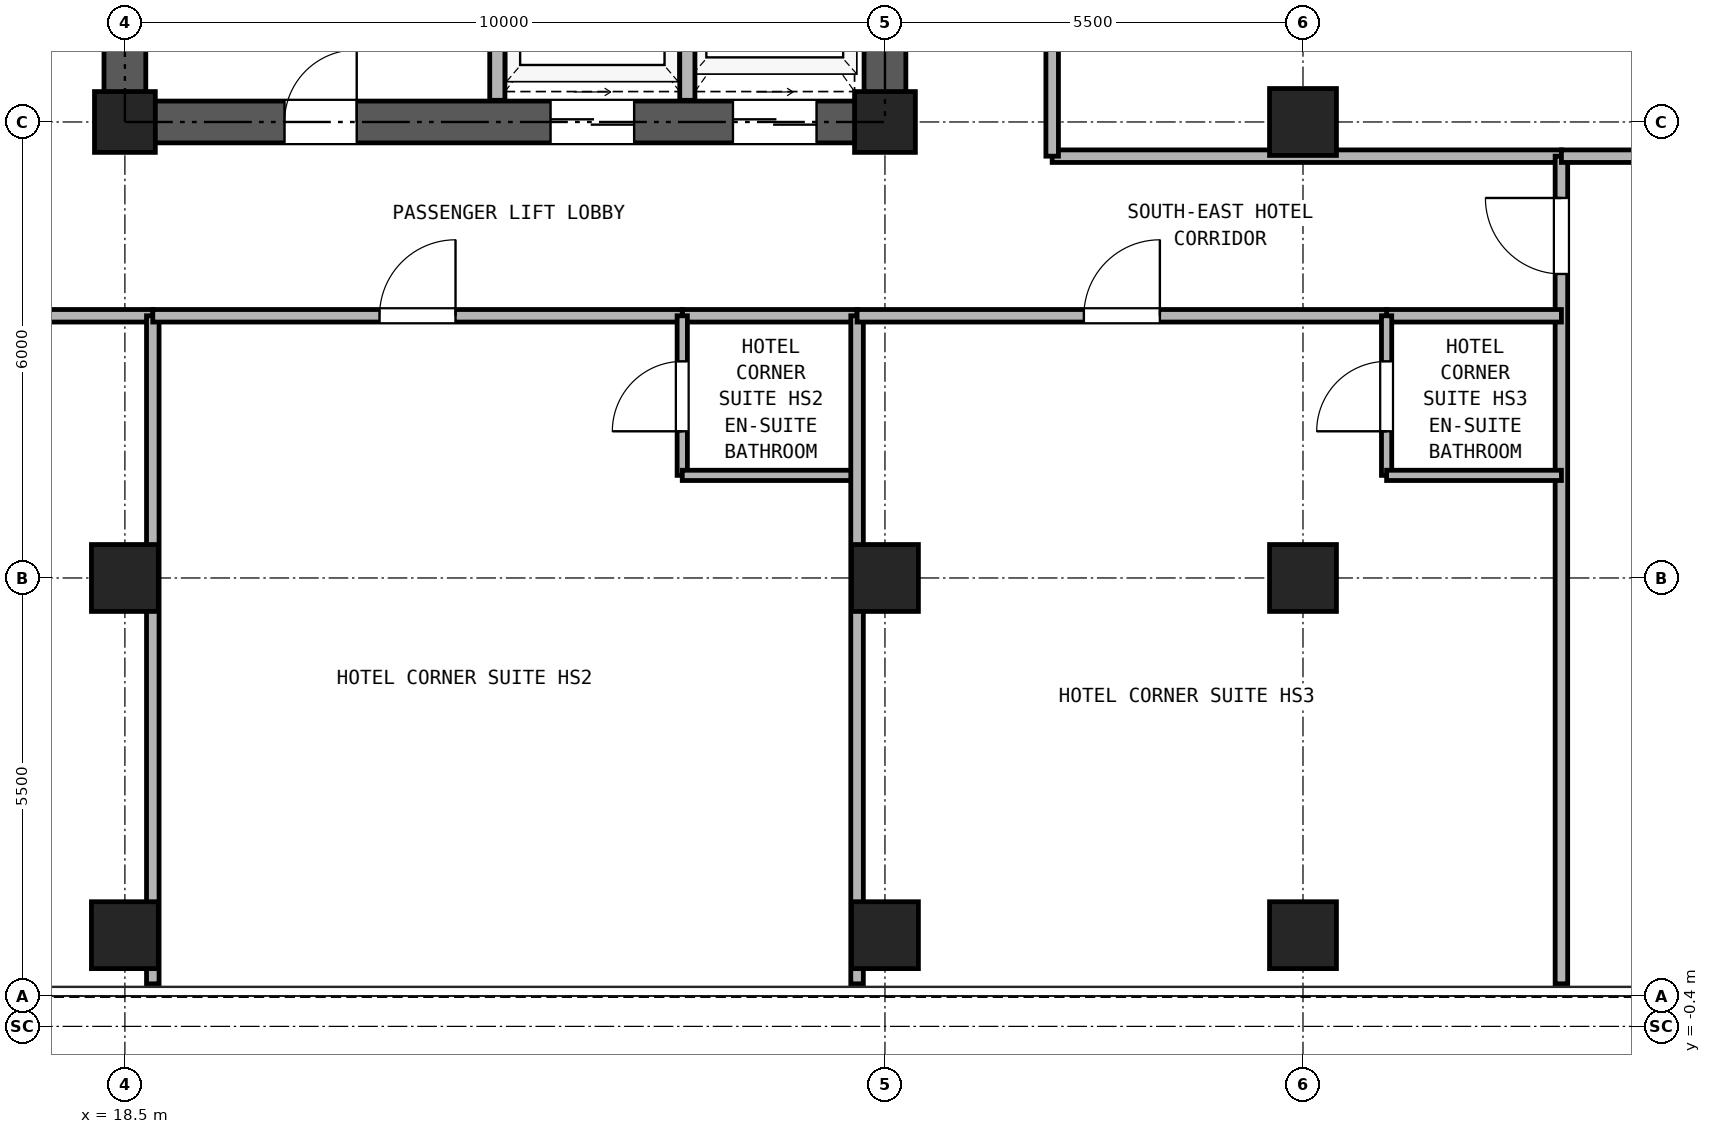
"""IFC4 building model, lengths in metres.
Left out: names, types, materials, properties, quantities, classifications, styles, units other than length and angle.
Written with IfcOpenShell. Run it as: python <this file> out.ifc"""

import sys

from ifc_helpers import new_model, si_unit, direction, frame, frame_2d, origin, origin_2d, place, context, subcontext, project, spatial, rectangle, hollow_rectangle, extrude, source, transform, mapped, element, fill, save


model = new_model("IFC4")
c1 = context("Model", 3, precision=1e-05, world=origin(), true_north=direction((0.0, 1.0)))
c2 = subcontext(c1, "Body", "Model", "MODEL_VIEW")
j1 = project(units=[si_unit("LENGTHUNIT", "METRE"), si_unit("PLANEANGLEUNIT", "RADIAN")], contexts=[c1])
p1 = place(None, origin())
s1 = spatial("IfcSite", under=j1, at=p1, CompositionType="ELEMENT")
p2 = place(p1, origin())
s2 = spatial("IfcBuilding", under=s1, at=p2, CompositionType="ELEMENT")
p3 = place(p2, frame((0.0, 0.0, 127.9)))
s3 = spatial("IfcBuildingStorey", under=s2, at=p3, CompositionType="ELEMENT", Elevation=127.9)
m1 = source(origin(), c2, "Body", "SweptSolid", [
    extrude(hollow_rectangle(XDim=0.88, YDim=0.88, WallThickness=0.05, at=origin_2d()), origin(), (0.0, 0.0, 1.0), 2.95),
])
for number, where, z_axis, x_axis in (
    (1, (18.5, 0.8, 0.0), (0.0, 0.0, 1.0), (1.0, 0.0, 0.0)),
    (2, (28.5, 0.8, 0.0), (0.0, 0.0, 1.0), (1.0, 0.0, 0.0)),
    (3, (34.0, 0.8, 0.0), (0.0, 0.0, 1.0), (1.0, 0.0, 0.0)),
    (4, (18.5, 5.5, 0.0), (0.0, 0.0, 1.0), (1.0, 0.0, 0.0)),
):
    element("IfcColumn", number, at=place(p3, frame(where, z_axis=z_axis, x_axis=x_axis)), inside=s3, PredefinedType="COLUMN", context=c2, shape_type="MappedRepresentation", body=[
        mapped(m1, transform((0.0, 0.0, 0.0), x_axis=(1.0, 0.0, 0.0), y_axis=(0.0, 1.0, 0.0), z_axis=(0.0, 0.0, 1.0), scale=1.0)),
    ])
m2 = source(origin(), c2, "Body", "SweptSolid", [
    extrude(hollow_rectangle(XDim=0.8, YDim=0.8, WallThickness=0.045, at=origin_2d()), origin(), (0.0, 0.0, 1.0), 2.95),
])
p4 = place(p3, frame((18.5, 11.5, 0.0), z_axis=(0.0, 0.0, 1.0), x_axis=(1.0, 0.0, 0.0)))
e5 = element("IfcColumn", 5, at=p4, inside=s3, PredefinedType="COLUMN", context=c2, shape_type="MappedRepresentation", body=[
    mapped(m2, transform((0.0, 0.0, 0.0), x_axis=(1.0, 0.0, 0.0), y_axis=(0.0, 1.0, 0.0), z_axis=(0.0, 0.0, 1.0), scale=1.0)),
])
p5 = place(p3, frame((28.5, 5.5, 0.0), z_axis=(0.0, 0.0, 1.0), x_axis=(1.0, 0.0, 0.0)))
e6 = element("IfcColumn", 6, at=p5, inside=s3, PredefinedType="COLUMN", context=c2, shape_type="MappedRepresentation", body=[
    mapped(m1, transform((0.0, 0.0, 0.0), x_axis=(1.0, 0.0, 0.0), y_axis=(0.0, 1.0, 0.0), z_axis=(0.0, 0.0, 1.0), scale=1.0)),
])
p6 = place(p3, frame((28.5, 11.5, 0.0), z_axis=(0.0, 0.0, 1.0), x_axis=(1.0, 0.0, 0.0)))
e7 = element("IfcColumn", 7, at=p6, inside=s3, PredefinedType="COLUMN", context=c2, shape_type="MappedRepresentation", body=[
    mapped(m2, transform((0.0, 0.0, 0.0), x_axis=(1.0, 0.0, 0.0), y_axis=(0.0, 1.0, 0.0), z_axis=(0.0, 0.0, 1.0), scale=1.0)),
])
for number, where, z_axis, x_axis in (
    (8, (34.0, 5.5, 0.0), (0.0, 0.0, 1.0), (1.0, 0.0, 0.0)),
    (9, (34.0, 11.5, 0.0), (0.0, 0.0, 1.0), (1.0, 0.0, 0.0)),
):
    element("IfcColumn", number, at=place(p3, frame(where, z_axis=z_axis, x_axis=x_axis)), inside=s3, PredefinedType="COLUMN", context=c2, shape_type="MappedRepresentation", body=[
        mapped(m1, transform((0.0, 0.0, 0.0), x_axis=(1.0, 0.0, 0.0), y_axis=(0.0, 1.0, 0.0), z_axis=(0.0, 0.0, 1.0), scale=1.0)),
    ])
p7 = place(p3, frame((18.225, 11.5, 0.0), z_axis=(0.0, 0.0, 1.0), x_axis=(1.0, 0.0, 0.0)))
e10 = element("IfcWall", 10, at=p7, inside=s3, PredefinedType="SHEAR", context=c2, shape_type="SweptSolid", body=[
    extrude(rectangle(XDim=10.55, YDim=0.55, at=frame_2d((5.275, 0.0))), origin(), (0.0, 0.0, 1.0), 2.95),
])
p8 = place(p7, frame((2.375, 0.0, 0.0)))
e11 = element("IfcOpeningElement", 11, at=p8, cuts=e10, PredefinedType="OPENING", context=c2, shape_type="SweptSolid", body=[
    extrude(rectangle(XDim=0.95, YDim=2.15, at=frame_2d((0.475, 1.075))), frame((0.0, 0.285, 0.0), z_axis=(0.0, -1.0, 0.0), x_axis=(1.0, 0.0, 0.0)), (0.0, 0.0, 1.0), 0.57),
])
p9 = place(p7, frame((5.875, 0.0, 0.0)))
e12 = element("IfcOpeningElement", 12, at=p9, cuts=e10, PredefinedType="OPENING", context=c2, shape_type="SweptSolid", body=[
    extrude(rectangle(XDim=1.1, YDim=2.25, at=frame_2d((0.55, 1.125))), frame((0.0, 0.285, 0.0), z_axis=(0.0, -1.0, 0.0), x_axis=(1.0, 0.0, 0.0)), (0.0, 0.0, 1.0), 0.57),
])
p10 = place(p7, frame((8.275, 0.0, 0.0)))
e13 = element("IfcOpeningElement", 13, at=p10, cuts=e10, PredefinedType="OPENING", context=c2, shape_type="SweptSolid", body=[
    extrude(rectangle(XDim=1.1, YDim=2.25, at=frame_2d((0.55, 1.125))), frame((0.0, 0.285, 0.0), z_axis=(0.0, -1.0, 0.0), x_axis=(1.0, 0.0, 0.0)), (0.0, 0.0, 1.0), 0.57),
])
p11 = place(p3, frame((18.5, 11.775, 0.0), z_axis=(0.0, 0.0, 1.0), x_axis=(0.0, 1.0, 0.0)))
e14 = element("IfcWall", 14, at=p11, inside=s3, PredefinedType="SHEAR", context=c2, shape_type="SweptSolid", body=[
    extrude(rectangle(XDim=16.7, YDim=0.55, at=frame_2d((8.35, 0.0))), origin(), (0.0, 0.0, 1.0), 2.95),
])
p12 = place(p11, frame((7.375, 0.0, 0.0)))
e15 = element("IfcOpeningElement", 15, at=p12, cuts=e14, PredefinedType="OPENING", context=c2, shape_type="SweptSolid", body=[
    extrude(rectangle(XDim=1.15, YDim=2.2, at=frame_2d((0.575, 1.1))), frame((0.0, 0.285, 0.0), z_axis=(0.0, -1.0, 0.0), x_axis=(1.0, 0.0, 0.0)), (0.0, 0.0, 1.0), 0.57),
])
p13 = place(p3, frame((28.5, 11.775, 0.0), z_axis=(0.0, 0.0, 1.0), x_axis=(0.0, 1.0, 0.0)))
e16 = element("IfcWall", 16, at=p13, inside=s3, PredefinedType="SHEAR", context=c2, shape_type="SweptSolid", body=[
    extrude(rectangle(XDim=16.7, YDim=0.55, at=frame_2d((8.35, 0.0))), origin(), (0.0, 0.0, 1.0), 2.95),
])
p14 = place(p13, frame((7.375, 0.0, 0.0)))
e17 = element("IfcOpeningElement", 17, at=p14, cuts=e16, PredefinedType="OPENING", context=c2, shape_type="SweptSolid", body=[
    extrude(rectangle(XDim=1.15, YDim=2.2, at=frame_2d((0.575, 1.1))), frame((0.0, 0.285, 0.0), z_axis=(0.0, -1.0, 0.0), x_axis=(1.0, 0.0, 0.0)), (0.0, 0.0, 1.0), 0.57),
])
for number, where, z_axis, x_axis in (
    (18, (23.4, 11.785, 0.0), (0.0, 0.0, 1.0), (0.0, 1.0, 0.0)),
    (19, (25.9, 11.785, 0.0), (0.0, 0.0, 1.0), (0.0, 1.0, 0.0)),
):
    element("IfcWall", number, at=place(p3, frame(where, z_axis=z_axis, x_axis=x_axis)), inside=s3, PredefinedType="PARTITIONING", context=c2, shape_type="SweptSolid", body=[
        extrude(rectangle(XDim=3.215, YDim=0.2, at=frame_2d((1.607, 0.0))), origin(), (0.0, 0.0, 1.0), 2.95),
    ])
p15 = place(p3, frame((30.7, 11.05, 0.0), z_axis=(0.0, 0.0, 1.0), x_axis=(1.0, 0.0, 0.0)))
e20 = element("IfcWall", 20, at=p15, inside=s3, PredefinedType="PARTITIONING", context=c2, shape_type="SweptSolid", body=[
    extrude(rectangle(XDim=6.7, YDim=0.165, at=frame_2d((3.35, 0.0))), origin(), (0.0, 0.0, 1.0), 2.95),
])
p16 = place(p3, frame((30.7, 11.05, 0.0), z_axis=(0.0, 0.0, 1.0), x_axis=(0.0, 1.0, 0.0)))
e21 = element("IfcWall", 21, at=p16, inside=s3, PredefinedType="PARTITIONING", context=c2, shape_type="SweptSolid", body=[
    extrude(rectangle(XDim=18.35, YDim=0.165, at=frame_2d((9.175, 0.0))), origin(), (0.0, 0.0, 1.0), 2.95),
])
p17 = place(p16, frame((8.675, 0.0, 0.0)))
e22 = element("IfcOpeningElement", 22, at=p17, cuts=e21, PredefinedType="OPENING", context=c2, shape_type="SweptSolid", body=[
    extrude(rectangle(XDim=0.95, YDim=2.15, at=frame_2d((0.475, 1.075))), frame((0.0, 0.093, 0.0), z_axis=(0.0, -1.0, 0.0), x_axis=(1.0, 0.0, 0.0)), (0.0, 0.0, 1.0), 0.185),
])
p18 = place(p3, frame((37.4, 0.16, 0.0), z_axis=(0.0, 0.0, 1.0), x_axis=(0.0, 1.0, 0.0)))
e23 = element("IfcWall", 23, at=p18, inside=s3, PredefinedType="PARTITIONING", context=c2, shape_type="SweptSolid", body=[
    extrude(rectangle(XDim=10.89, YDim=0.165, at=frame_2d((5.445, 0.0))), origin(), (0.0, 0.0, 1.0), 2.95),
])
p19 = place(p18, frame((9.34, 0.0, 0.0)))
e24 = element("IfcOpeningElement", 24, at=p19, cuts=e23, PredefinedType="OPENING", context=c2, shape_type="SweptSolid", body=[
    extrude(rectangle(XDim=1.0, YDim=2.15, at=frame_2d((0.5, 1.075))), frame((0.0, 0.093, 0.0), z_axis=(0.0, -1.0, 0.0), x_axis=(1.0, 0.0, 0.0)), (0.0, 0.0, 1.0), 0.185),
])
p20 = place(p3, frame((37.4, 11.05, 0.0), z_axis=(0.0, 0.0, 1.0), x_axis=(1.0, 0.0, 0.0)))
e25 = element("IfcWall", 25, at=p20, inside=s3, PredefinedType="PARTITIONING", context=c2, shape_type="SweptSolid", body=[
    extrude(rectangle(XDim=9.44, YDim=0.165, at=frame_2d((4.72, 0.0))), origin(), (0.0, 0.0, 1.0), 2.95),
])
p21 = place(p3, frame((11.9, 8.95, 0.0), z_axis=(0.0, 0.0, 1.0), x_axis=(1.0, 0.0, 0.0)))
e26 = element("IfcWall", 26, at=p21, inside=s3, PredefinedType="PARTITIONING", context=c2, shape_type="SweptSolid", body=[
    extrude(rectangle(XDim=6.967, YDim=0.165, at=frame_2d((3.483, 0.0))), origin(), (0.0, 0.0, 1.0), 2.95),
])
p22 = place(p21, frame((2.983, 0.0, 0.0)))
e27 = element("IfcOpeningElement", 27, at=p22, cuts=e26, PredefinedType="OPENING", context=c2, shape_type="SweptSolid", body=[
    extrude(rectangle(XDim=1.0, YDim=2.15, at=frame_2d((0.5, 1.075))), frame((0.0, 0.093, 0.0), z_axis=(0.0, -1.0, 0.0), x_axis=(1.0, 0.0, 0.0)), (0.0, 0.0, 1.0), 0.185),
])
p23 = place(p3, frame((18.867, 0.16, 0.0), z_axis=(0.0, 0.0, 1.0), x_axis=(0.0, 1.0, 0.0)))
e28 = element("IfcWall", 28, at=p23, inside=s3, PredefinedType="PARTITIONING", context=c2, shape_type="SweptSolid", body=[
    extrude(rectangle(XDim=8.79, YDim=0.165, at=frame_2d((4.395, 0.0))), origin(), (0.0, 0.0, 1.0), 2.95),
])
p24 = place(p3, frame((25.833, 8.95, 0.0), z_axis=(0.0, 0.0, 1.0), x_axis=(1.0, 0.0, 0.0)))
e29 = element("IfcWall", 29, at=p24, inside=s3, PredefinedType="PARTITIONING", context=c2, shape_type="SweptSolid", body=[
    extrude(rectangle(XDim=2.3, YDim=0.165, at=frame_2d((1.15, 0.0))), origin(), (0.0, 0.0, 1.0), 2.95),
])
p25 = place(p3, frame((18.867, 8.95, 0.0), z_axis=(0.0, 0.0, 1.0), x_axis=(1.0, 0.0, 0.0)))
e30 = element("IfcWall", 30, at=p25, inside=s3, PredefinedType="PARTITIONING", context=c2, shape_type="SweptSolid", body=[
    extrude(rectangle(XDim=6.966, YDim=0.165, at=frame_2d((3.483, 0.0))), origin(), (0.0, 0.0, 1.0), 2.95),
])
p26 = place(p25, frame((2.983, 0.0, 0.0)))
e31 = element("IfcOpeningElement", 31, at=p26, cuts=e30, PredefinedType="OPENING", context=c2, shape_type="SweptSolid", body=[
    extrude(rectangle(XDim=1.0, YDim=2.15, at=frame_2d((0.5, 1.075))), frame((0.0, 0.093, 0.0), z_axis=(0.0, -1.0, 0.0), x_axis=(1.0, 0.0, 0.0)), (0.0, 0.0, 1.0), 0.185),
])
p27 = place(p3, frame((25.833, 6.85, 0.0), z_axis=(0.0, 0.0, 1.0), x_axis=(0.0, 1.0, 0.0)))
e32 = element("IfcWall", 32, at=p27, inside=s3, PredefinedType="PARTITIONING", context=c2, shape_type="SweptSolid", body=[
    extrude(rectangle(XDim=2.1, YDim=0.135, at=frame_2d((1.05, 0.0))), origin(), (0.0, 0.0, 1.0), 2.95),
])
p28 = place(p27, frame((0.58, 0.0, 0.0)))
e33 = element("IfcOpeningElement", 33, at=p28, cuts=e32, PredefinedType="OPENING", context=c2, shape_type="SweptSolid", body=[
    extrude(rectangle(XDim=0.92, YDim=2.1, at=frame_2d((0.46, 1.05))), frame((0.0, 0.077, 0.0), z_axis=(0.0, -1.0, 0.0), x_axis=(1.0, 0.0, 0.0)), (0.0, 0.0, 1.0), 0.155),
])
p29 = place(p3, frame((25.833, 6.85, 0.0), z_axis=(0.0, 0.0, 1.0), x_axis=(1.0, 0.0, 0.0)))
e34 = element("IfcWall", 34, at=p29, inside=s3, PredefinedType="PARTITIONING", context=c2, shape_type="SweptSolid", body=[
    extrude(rectangle(XDim=2.3, YDim=0.135, at=frame_2d((1.15, 0.0))), origin(), (0.0, 0.0, 1.0), 2.95),
])
p30 = place(p3, frame((28.133, 0.16, 0.0), z_axis=(0.0, 0.0, 1.0), x_axis=(0.0, 1.0, 0.0)))
e35 = element("IfcWall", 35, at=p30, inside=s3, PredefinedType="PARTITIONING", context=c2, shape_type="SweptSolid", body=[
    extrude(rectangle(XDim=8.79, YDim=0.165, at=frame_2d((4.395, 0.0))), origin(), (0.0, 0.0, 1.0), 2.95),
])
p31 = place(p3, frame((35.1, 8.95, 0.0), z_axis=(0.0, 0.0, 1.0), x_axis=(1.0, 0.0, 0.0)))
e36 = element("IfcWall", 36, at=p31, inside=s3, PredefinedType="PARTITIONING", context=c2, shape_type="SweptSolid", body=[
    extrude(rectangle(XDim=2.3, YDim=0.165, at=frame_2d((1.15, 0.0))), origin(), (0.0, 0.0, 1.0), 2.95),
])
p32 = place(p3, frame((28.133, 8.95, 0.0), z_axis=(0.0, 0.0, 1.0), x_axis=(1.0, 0.0, 0.0)))
e37 = element("IfcWall", 37, at=p32, inside=s3, PredefinedType="PARTITIONING", context=c2, shape_type="SweptSolid", body=[
    extrude(rectangle(XDim=6.967, YDim=0.165, at=frame_2d((3.483, 0.0))), origin(), (0.0, 0.0, 1.0), 2.95),
])
p33 = place(p32, frame((2.984, 0.0, 0.0)))
e38 = element("IfcOpeningElement", 38, at=p33, cuts=e37, PredefinedType="OPENING", context=c2, shape_type="SweptSolid", body=[
    extrude(rectangle(XDim=1.0, YDim=2.15, at=frame_2d((0.5, 1.075))), frame((0.0, 0.093, 0.0), z_axis=(0.0, -1.0, 0.0), x_axis=(1.0, 0.0, 0.0)), (0.0, 0.0, 1.0), 0.185),
])
p34 = place(p3, frame((35.1, 6.85, 0.0), z_axis=(0.0, 0.0, 1.0), x_axis=(0.0, 1.0, 0.0)))
e39 = element("IfcWall", 39, at=p34, inside=s3, PredefinedType="PARTITIONING", context=c2, shape_type="SweptSolid", body=[
    extrude(rectangle(XDim=2.1, YDim=0.135, at=frame_2d((1.05, 0.0))), origin(), (0.0, 0.0, 1.0), 2.95),
])
p35 = place(p34, frame((0.58, 0.0, 0.0)))
e40 = element("IfcOpeningElement", 40, at=p35, cuts=e39, PredefinedType="OPENING", context=c2, shape_type="SweptSolid", body=[
    extrude(rectangle(XDim=0.92, YDim=2.1, at=frame_2d((0.46, 1.05))), frame((0.0, 0.077, 0.0), z_axis=(0.0, -1.0, 0.0), x_axis=(1.0, 0.0, 0.0)), (0.0, 0.0, 1.0), 0.155),
])
p36 = place(p3, frame((35.1, 6.85, 0.0), z_axis=(0.0, 0.0, 1.0), x_axis=(1.0, 0.0, 0.0)))
e41 = element("IfcWall", 41, at=p36, inside=s3, PredefinedType="PARTITIONING", context=c2, shape_type="SweptSolid", body=[
    extrude(rectangle(XDim=2.3, YDim=0.135, at=frame_2d((1.15, 0.0))), origin(), (0.0, 0.0, 1.0), 2.95),
])
p37 = place(p8, frame((0.95, 0.0, 0.0), z_axis=(0.0, 0.0, 1.0), x_axis=(-1.0, 0.0, 0.0)))
e42 = element("IfcDoor", 42, at=p37, inside=s3, OperationType="SINGLE_SWING_RIGHT", PredefinedType="DOOR", context=c2, shape_type="SweptSolid", body=[
    extrude(rectangle(XDim=0.95, YDim=2.15, at=frame_2d((0.475, 1.075))), frame((0.0, 0.025, 0.0), z_axis=(0.0, -1.0, 0.0), x_axis=(1.0, 0.0, 0.0)), (0.0, 0.0, 1.0), 0.05),
])
fill(e11, e42)
p38 = place(p9, frame((1.1, 0.0, 0.0), z_axis=(0.0, 0.0, 1.0), x_axis=(-1.0, 0.0, 0.0)))
e43 = element("IfcDoor", 43, at=p38, inside=s3, OperationType="DOUBLE_DOOR_SLIDING", PredefinedType="DOOR", context=c2, shape_type="SweptSolid", body=[
    extrude(rectangle(XDim=1.1, YDim=2.25, at=frame_2d((0.55, 1.125))), frame((0.0, 0.025, 0.0), z_axis=(0.0, -1.0, 0.0), x_axis=(1.0, 0.0, 0.0)), (0.0, 0.0, 1.0), 0.05),
])
fill(e12, e43)
p39 = place(p10, frame((1.1, 0.0, 0.0), z_axis=(0.0, 0.0, 1.0), x_axis=(-1.0, 0.0, 0.0)))
e44 = element("IfcDoor", 44, at=p39, inside=s3, OperationType="DOUBLE_DOOR_SLIDING", PredefinedType="DOOR", context=c2, shape_type="SweptSolid", body=[
    extrude(rectangle(XDim=1.1, YDim=2.25, at=frame_2d((0.55, 1.125))), frame((0.0, 0.025, 0.0), z_axis=(0.0, -1.0, 0.0), x_axis=(1.0, 0.0, 0.0)), (0.0, 0.0, 1.0), 0.05),
])
fill(e13, e44)
p40 = place(p19, frame((1.0, 0.0, 0.0), z_axis=(0.0, 0.0, 1.0), x_axis=(-1.0, 0.0, 0.0)))
e45 = element("IfcDoor", 45, at=p40, inside=s3, OperationType="SINGLE_SWING_RIGHT", PredefinedType="DOOR", context=c2, shape_type="SweptSolid", body=[
    extrude(rectangle(XDim=1.0, YDim=2.15, at=frame_2d((0.5, 1.075))), frame((0.0, 0.025, 0.0), z_axis=(0.0, -1.0, 0.0), x_axis=(1.0, 0.0, 0.0)), (0.0, 0.0, 1.0), 0.05),
])
fill(e24, e45)
p41 = place(p28, origin())
e46 = element("IfcDoor", 46, at=p41, inside=s3, OperationType="SINGLE_SWING_LEFT", PredefinedType="DOOR", context=c2, shape_type="SweptSolid", body=[
    extrude(rectangle(XDim=0.92, YDim=2.1, at=frame_2d((0.46, 1.05))), frame((0.0, 0.025, 0.0), z_axis=(0.0, -1.0, 0.0), x_axis=(1.0, 0.0, 0.0)), (0.0, 0.0, 1.0), 0.05),
])
fill(e33, e46)
p42 = place(p26, frame((1.0, 0.0, 0.0), z_axis=(0.0, 0.0, 1.0), x_axis=(-1.0, 0.0, 0.0)))
e47 = element("IfcDoor", 47, at=p42, inside=s3, OperationType="SINGLE_SWING_RIGHT", PredefinedType="DOOR", context=c2, shape_type="SweptSolid", body=[
    extrude(rectangle(XDim=1.0, YDim=2.15, at=frame_2d((0.5, 1.075))), frame((0.0, 0.025, 0.0), z_axis=(0.0, -1.0, 0.0), x_axis=(1.0, 0.0, 0.0)), (0.0, 0.0, 1.0), 0.05),
])
fill(e31, e47)
p43 = place(p35, origin())
e48 = element("IfcDoor", 48, at=p43, inside=s3, OperationType="SINGLE_SWING_LEFT", PredefinedType="DOOR", context=c2, shape_type="SweptSolid", body=[
    extrude(rectangle(XDim=0.92, YDim=2.1, at=frame_2d((0.46, 1.05))), frame((0.0, 0.025, 0.0), z_axis=(0.0, -1.0, 0.0), x_axis=(1.0, 0.0, 0.0)), (0.0, 0.0, 1.0), 0.05),
])
fill(e40, e48)
p44 = place(p33, frame((1.0, 0.0, 0.0), z_axis=(0.0, 0.0, 1.0), x_axis=(-1.0, 0.0, 0.0)))
e49 = element("IfcDoor", 49, at=p44, inside=s3, OperationType="SINGLE_SWING_RIGHT", PredefinedType="DOOR", context=c2, shape_type="SweptSolid", body=[
    extrude(rectangle(XDim=1.0, YDim=2.15, at=frame_2d((0.5, 1.075))), frame((0.0, 0.025, 0.0), z_axis=(0.0, -1.0, 0.0), x_axis=(1.0, 0.0, 0.0)), (0.0, 0.0, 1.0), 0.05),
])
fill(e38, e49)
save(model, sys.argv[1])
